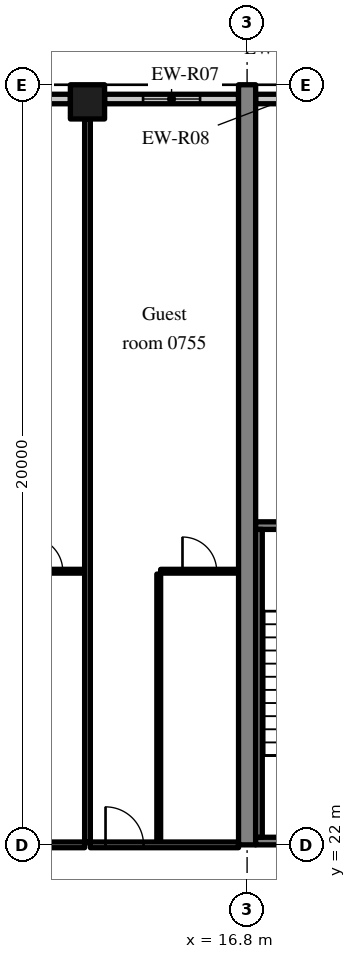
"""IFC4 building model, lengths in metres.
Left out: names, types, materials, properties, quantities, classifications, styles, units other than length and angle.
Written with IfcOpenShell. Run it as: python <this file> out.ifc"""

import sys

from ifc_helpers import new_model, si_unit, direction, frame, frame_2d, origin, origin_2d, place, context, subcontext, project, spatial, rectangle, extrude, source, transform, mapped, element, fill, save


model = new_model("IFC4")
c1 = context("Model", 3, precision=1e-05, world=origin(), true_north=direction((0.0, 1.0)))
c2 = subcontext(c1, "Body", "Model", "MODEL_VIEW")
j1 = project(units=[si_unit("LENGTHUNIT", "METRE"), si_unit("PLANEANGLEUNIT", "RADIAN")], contexts=[c1])
p1 = place(None, origin())
s1 = spatial("IfcSite", under=j1, at=p1, CompositionType="ELEMENT")
p2 = place(p1, origin())
s2 = spatial("IfcBuilding", under=s1, at=p2, CompositionType="ELEMENT")
p3 = place(p2, frame((0.0, 0.0, 35.4)))
s3 = spatial("IfcBuildingStorey", under=s2, at=p3, CompositionType="ELEMENT", Elevation=35.4)
m1 = source(origin(), c2, "Body", "SweptSolid", [
    extrude(rectangle(XDim=20.0, YDim=0.45, at=frame_2d((10.0, 0.0))), origin(), (0.0, 0.0, 1.0), 3.52),
])
p4 = place(p3, frame((16.8, 22.0, 0.0), z_axis=(0.0, 0.0, 1.0), x_axis=(0.0, 1.0, 0.0)))
e1 = element("IfcWall", 1, at=p4, inside=s3, PredefinedType="SHEAR", context=c2, shape_type="MappedRepresentation", body=[
    mapped(m1, transform((0.0, 0.0, 0.0), scale=1.0)),
])
m2 = source(origin(), c2, "Body", "SweptSolid", [
    extrude(rectangle(XDim=0.9, YDim=0.9, at=origin_2d()), origin(), (0.0, 0.0, 1.0), 3.52),
])
p5 = place(p3, frame((12.6, 41.55, 0.0), z_axis=(0.0, 0.0, 1.0), x_axis=(1.0, 0.0, 0.0)))
e2 = element("IfcColumn", 2, at=p5, inside=s3, PredefinedType="COLUMN", context=c2, shape_type="MappedRepresentation", body=[
    mapped(m2, transform((0.0, 0.0, 0.0), scale=1.0)),
])
m3 = source(origin(), c2, "Body", "SweptSolid", [
    extrude(rectangle(XDim=3.525, YDim=0.25, at=frame_2d((1.762, 0.0))), origin(), (0.0, 0.0, 1.0), 2.77),
])
p6 = place(p3, frame((12.15, 41.625, 0.0), z_axis=(0.0, 0.0, 1.0), x_axis=(-1.0, 0.0, 0.0)))
e3 = element("IfcWall", 3, at=p6, inside=s3, PredefinedType="SOLIDWALL", context=c2, shape_type="MappedRepresentation", body=[
    mapped(m3, transform((0.0, 0.0, 0.0), scale=1.0)),
])
m4 = source(origin(), c2, "Body", "SweptSolid", [
    extrude(rectangle(XDim=1.5, YDim=1.5, at=frame_2d((0.75, 0.75))), frame((0.0, 0.135, 0.0), z_axis=(0.0, -1.0, 0.0), x_axis=(1.0, 0.0, 0.0)), (0.0, 0.0, 1.0), 0.27),
])
p7 = place(p6, frame((1.012, 0.0, 0.9)))
e4 = element("IfcOpeningElement", 4, at=p7, cuts=e3, PredefinedType="OPENING", context=c2, shape_type="MappedRepresentation", body=[
    mapped(m4, transform((0.0, 0.0, 0.0), scale=1.0)),
])
p8 = place(p3, frame((16.575, 41.625, 0.0), z_axis=(0.0, 0.0, 1.0), x_axis=(-1.0, 0.0, 0.0)))
e5 = element("IfcWall", 5, at=p8, inside=s3, PredefinedType="SOLIDWALL", context=c2, shape_type="MappedRepresentation", body=[
    mapped(m3, transform((0.0, 0.0, 0.0), scale=1.0)),
])
p9 = place(p8, frame((1.012, 0.0, 0.9)))
e6 = element("IfcOpeningElement", 6, at=p9, cuts=e5, PredefinedType="OPENING", context=c2, shape_type="MappedRepresentation", body=[
    mapped(m4, transform((0.0, 0.0, 0.0), scale=1.0)),
])
m5 = source(origin(), c2, "Body", "SweptSolid", [
    extrude(rectangle(XDim=1.633, YDim=0.25, at=frame_2d((0.816, 0.0))), origin(), (0.0, 0.0, 1.0), 2.77),
])
p10 = place(p3, frame((18.658, 41.625, 0.0), z_axis=(0.0, 0.0, 1.0), x_axis=(-1.0, 0.0, 0.0)))
e7 = element("IfcWall", 7, at=p10, inside=s3, PredefinedType="SOLIDWALL", context=c2, shape_type="MappedRepresentation", body=[
    mapped(m5, transform((0.0, 0.0, 0.0), scale=1.0)),
])
m6 = source(origin(), c2, "Body", "SweptSolid", [
    extrude(rectangle(XDim=8.175, YDim=0.2, at=frame_2d((4.087, 0.0))), origin(), (0.0, 0.0, 1.0), 3.52),
])
p11 = place(p3, frame((17.025, 22.1, 0.0), z_axis=(0.0, 0.0, 1.0), x_axis=(1.0, 0.0, 0.0)))
e8 = element("IfcWall", 8, at=p11, inside=s3, PredefinedType="SOLIDWALL", context=c2, shape_type="MappedRepresentation", body=[
    mapped(m6, transform((0.0, 0.0, 0.0), scale=1.0)),
])
m7 = source(origin(), c2, "Body", "SweptSolid", [
    extrude(rectangle(XDim=1.2, YDim=2.1, at=frame_2d((0.6, 1.05))), frame((0.0, 0.11, 0.0), z_axis=(0.0, -1.0, 0.0), x_axis=(1.0, 0.0, 0.0)), (0.0, 0.0, 1.0), 0.22),
])
p12 = place(p11, frame((5.975, 0.0, 0.0)))
e9 = element("IfcOpeningElement", 9, at=p12, cuts=e8, PredefinedType="OPENING", context=c2, shape_type="MappedRepresentation", body=[
    mapped(m7, transform((0.0, 0.0, 0.0), scale=1.0)),
])
p13 = place(p3, frame((17.025, 30.4, 0.0), z_axis=(0.0, 0.0, 1.0), x_axis=(1.0, 0.0, 0.0)))
e10 = element("IfcWall", 10, at=p13, inside=s3, PredefinedType="SOLIDWALL", context=c2, shape_type="MappedRepresentation", body=[
    mapped(m6, transform((0.0, 0.0, 0.0), scale=1.0)),
])
m8 = source(origin(), c2, "Body", "SweptSolid", [
    extrude(rectangle(XDim=1.0, YDim=2.1, at=frame_2d((0.5, 1.05))), frame((0.0, 0.11, 0.0), z_axis=(0.0, -1.0, 0.0), x_axis=(1.0, 0.0, 0.0)), (0.0, 0.0, 1.0), 0.22),
])
p14 = place(p13, frame((6.075, 0.0, 0.0)))
e11 = element("IfcOpeningElement", 11, at=p14, cuts=e10, PredefinedType="OPENING", context=c2, shape_type="MappedRepresentation", body=[
    mapped(m8, transform((0.0, 0.0, 0.0), scale=1.0)),
])
m9 = source(origin(), c2, "Body", "SweptSolid", [
    extrude(rectangle(XDim=8.1, YDim=0.175, at=frame_2d((4.05, 0.0))), origin(), (0.0, 0.0, 1.0), 3.52),
])
p15 = place(p3, frame((17.112, 22.2, 0.0), z_axis=(0.0, 0.0, 1.0), x_axis=(0.0, 1.0, 0.0)))
e12 = element("IfcWall", 12, at=p15, inside=s3, PredefinedType="SOLIDWALL", context=c2, shape_type="MappedRepresentation", body=[
    mapped(m9, transform((0.0, 0.0, 0.0), scale=1.0)),
])
m10 = source(origin(), c2, "Body", "SweptSolid", [
    extrude(rectangle(XDim=2.05, YDim=0.1, at=frame_2d((1.025, 0.0))), origin(), (0.0, 0.0, 1.0), 3.52),
])
p16 = place(p3, frame((10.475, 29.2, 0.0), z_axis=(0.0, 0.0, 1.0), x_axis=(1.0, 0.0, 0.0)))
e13 = element("IfcWall", 13, at=p16, inside=s3, PredefinedType="PARTITIONING", context=c2, shape_type="MappedRepresentation", body=[
    mapped(m10, transform((0.0, 0.0, 0.0), scale=1.0)),
])
m11 = source(origin(), c2, "Body", "SweptSolid", [
    extrude(rectangle(XDim=0.9, YDim=2.1, at=frame_2d((0.45, 1.05))), frame((0.0, 0.06, 0.0), z_axis=(0.0, -1.0, 0.0), x_axis=(1.0, 0.0, 0.0)), (0.0, 0.0, 1.0), 0.12),
])
p17 = place(p16, frame((0.575, 0.0, 0.0)))
e14 = element("IfcOpeningElement", 14, at=p17, cuts=e13, PredefinedType="OPENING", context=c2, shape_type="MappedRepresentation", body=[
    mapped(m11, transform((0.0, 0.0, 0.0), scale=1.0)),
])
m12 = source(origin(), c2, "Body", "SweptSolid", [
    extrude(rectangle(XDim=3.9, YDim=0.15, at=frame_2d((1.95, 0.0))), origin(), (0.0, 0.0, 1.0), 2.82),
])
p18 = place(p3, frame((8.625, 22.0, 0.0), z_axis=(0.0, 0.0, 1.0), x_axis=(1.0, 0.0, 0.0)))
e15 = element("IfcWall", 15, at=p18, inside=s3, PredefinedType="PARTITIONING", context=c2, shape_type="MappedRepresentation", body=[
    mapped(m12, transform((0.0, 0.0, 0.0), scale=1.0)),
])
m13 = source(origin(), c2, "Body", "SweptSolid", [
    extrude(rectangle(XDim=1.0, YDim=2.1, at=frame_2d((0.5, 1.05))), frame((0.0, 0.085, 0.0), z_axis=(0.0, -1.0, 0.0), x_axis=(1.0, 0.0, 0.0)), (0.0, 0.0, 1.0), 0.17),
])
p19 = place(p18, frame((0.4, 0.0, 0.0)))
e16 = element("IfcOpeningElement", 16, at=p19, cuts=e15, PredefinedType="OPENING", context=c2, shape_type="MappedRepresentation", body=[
    mapped(m13, transform((0.0, 0.0, 0.0), scale=1.0)),
])
m14 = source(origin(), c2, "Body", "SweptSolid", [
    extrude(rectangle(XDim=7.05, YDim=0.1, at=frame_2d((3.525, 0.0))), origin(), (0.0, 0.0, 1.0), 3.52),
])
p20 = place(p3, frame((14.475, 22.075, 0.0), z_axis=(0.0, 0.0, 1.0), x_axis=(0.0, 1.0, 0.0)))
e17 = element("IfcWall", 17, at=p20, inside=s3, PredefinedType="PARTITIONING", context=c2, shape_type="MappedRepresentation", body=[
    mapped(m14, transform((0.0, 0.0, 0.0), scale=1.0)),
])
m15 = source(origin(), c2, "Body", "SweptSolid", [
    extrude(rectangle(XDim=2.05, YDim=0.1, at=frame_2d((1.025, 0.0))), origin(), (0.0, 0.0, 1.0), 3.52),
])
p21 = place(p3, frame((14.525, 29.2, 0.0), z_axis=(0.0, 0.0, 1.0), x_axis=(1.0, 0.0, 0.0)))
e18 = element("IfcWall", 18, at=p21, inside=s3, PredefinedType="PARTITIONING", context=c2, shape_type="MappedRepresentation", body=[
    mapped(m15, transform((0.0, 0.0, 0.0), scale=1.0)),
])
p22 = place(p21, frame((0.575, 0.0, 0.0)))
e19 = element("IfcOpeningElement", 19, at=p22, cuts=e18, PredefinedType="OPENING", context=c2, shape_type="MappedRepresentation", body=[
    mapped(m11, transform((0.0, 0.0, 0.0), scale=1.0)),
])
p23 = place(p3, frame((12.675, 22.0, 0.0), z_axis=(0.0, 0.0, 1.0), x_axis=(1.0, 0.0, 0.0)))
e20 = element("IfcWall", 20, at=p23, inside=s3, PredefinedType="PARTITIONING", context=c2, shape_type="MappedRepresentation", body=[
    mapped(m12, transform((0.0, 0.0, 0.0), scale=1.0)),
])
p24 = place(p23, frame((0.4, 0.0, 0.0)))
e21 = element("IfcOpeningElement", 21, at=p24, cuts=e20, PredefinedType="OPENING", context=c2, shape_type="MappedRepresentation", body=[
    mapped(m13, transform((0.0, 0.0, 0.0), scale=1.0)),
])
m16 = source(origin(), c2, "Body", "SweptSolid", [
    extrude(rectangle(XDim=19.025, YDim=0.15, at=frame_2d((9.513, 0.0))), origin(), (0.0, 0.0, 1.0), 3.52),
])
p25 = place(p3, frame((12.6, 22.075, 0.0), z_axis=(0.0, 0.0, 1.0), x_axis=(0.0, 1.0, 0.0)))
e22 = element("IfcWall", 22, at=p25, inside=s3, PredefinedType="PARTITIONING", context=c2, shape_type="MappedRepresentation", body=[
    mapped(m16, transform((0.0, 0.0, 0.0), scale=1.0)),
])
m17 = source(origin(), c2, "Body", "SweptSolid", [
    extrude(rectangle(XDim=1.5, YDim=1.5, at=frame_2d((0.75, 0.75))), frame((0.0, 0.03, 0.0), z_axis=(0.0, -1.0, 0.0), x_axis=(1.0, 0.0, 0.0)), (0.0, 0.0, 1.0), 0.06),
])
p26 = place(p9, origin())
e23 = element("IfcWindow", 23, at=p26, inside=s3, PartitioningType="SINGLE_PANEL", PredefinedType="WINDOW", context=c2, shape_type="MappedRepresentation", body=[
    mapped(m17, transform((0.0, 0.0, 0.0), scale=1.0)),
])
fill(e6, e23)
m18 = source(origin(), c2, "Body", "SweptSolid", [
    extrude(rectangle(XDim=0.9, YDim=2.1, at=frame_2d((0.45, 1.05))), frame((0.0, 0.025, 0.0), z_axis=(0.0, -1.0, 0.0), x_axis=(1.0, 0.0, 0.0)), (0.0, 0.0, 1.0), 0.05),
])
p27 = place(p17, origin())
e24 = element("IfcDoor", 24, at=p27, inside=s3, OperationType="SINGLE_SWING_LEFT", PredefinedType="DOOR", context=c2, shape_type="MappedRepresentation", body=[
    mapped(m18, transform((0.0, 0.0, 0.0), scale=1.0)),
])
fill(e14, e24)
p28 = place(p22, origin())
e25 = element("IfcDoor", 25, at=p28, inside=s3, OperationType="SINGLE_SWING_LEFT", PredefinedType="DOOR", context=c2, shape_type="MappedRepresentation", body=[
    mapped(m18, transform((0.0, 0.0, 0.0), scale=1.0)),
])
fill(e19, e25)
m19 = source(origin(), c2, "Body", "SweptSolid", [
    extrude(rectangle(XDim=1.0, YDim=2.1, at=frame_2d((0.5, 1.05))), frame((0.0, 0.025, 0.0), z_axis=(0.0, -1.0, 0.0), x_axis=(1.0, 0.0, 0.0)), (0.0, 0.0, 1.0), 0.05),
])
p29 = place(p24, origin())
e26 = element("IfcDoor", 26, at=p29, inside=s3, OperationType="SINGLE_SWING_LEFT", PredefinedType="DOOR", context=c2, shape_type="MappedRepresentation", body=[
    mapped(m19, transform((0.0, 0.0, 0.0), scale=1.0)),
])
fill(e21, e26)
save(model, sys.argv[1])
